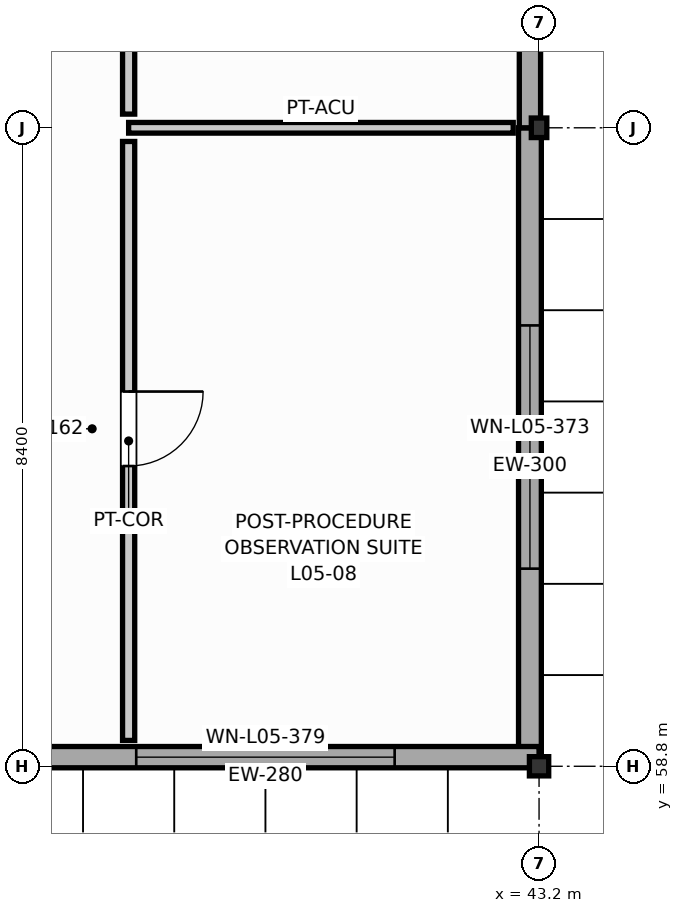
"""IFC4 building model, lengths in metres.
Left out: names, types, materials, properties, quantities, classifications, styles, units other than length and angle.
Written with IfcOpenShell. Run it as: python <this file> out.ifc"""

import sys

from ifc_helpers import new_model, si_unit, direction, frame, frame_2d, origin, origin_2d, place, context, subcontext, project, spatial, rectangle, i_section, extrude, element, fill, save


model = new_model("IFC4")
c1 = context("Model", 3, precision=1e-05, world=origin(), true_north=direction((0.0, 1.0)))
c2 = subcontext(c1, "Body", "Model", "MODEL_VIEW")
j1 = project(units=[si_unit("LENGTHUNIT", "METRE"), si_unit("PLANEANGLEUNIT", "RADIAN")], contexts=[c1])
p1 = place(None, origin())
s1 = spatial("IfcSite", under=j1, at=p1, CompositionType="ELEMENT")
p2 = place(p1, origin())
s2 = spatial("IfcBuilding", under=s1, at=p2, CompositionType="ELEMENT")
p3 = place(p2, frame((0.0, 0.0, 21.6)))
s3 = spatial("IfcBuildingStorey", under=s2, at=p3, CompositionType="ELEMENT", Elevation=21.6)
p4 = place(p3, frame((43.2, 58.8, 0.0), z_axis=(0.0, 0.0, 1.0), x_axis=(1.0, 0.0, 0.0)))
e1 = element("IfcColumn", 1, at=p4, inside=s3, PredefinedType="COLUMN", context=c2, shape_type="SweptSolid", body=[
    extrude(i_section(OverallWidth=0.254, OverallDepth=0.253, WebThickness=0.009, FlangeThickness=0.014, FilletRadius=0.013, at=origin_2d()), origin(), (0.0, 0.0, 1.0), 4.2),
])
p5 = place(p3, frame((43.2, 67.2, 0.0), z_axis=(0.0, 0.0, 1.0), x_axis=(1.0, 0.0, 0.0)))
e2 = element("IfcColumn", 2, at=p5, inside=s3, PredefinedType="COLUMN", context=c2, shape_type="SweptSolid", body=[
    extrude(i_section(OverallWidth=0.204, OverallDepth=0.257, WebThickness=0.009, FlangeThickness=0.016, FilletRadius=0.013, at=origin_2d()), origin(), (0.0, 0.0, 1.0), 4.2),
])
p6 = place(p3, frame((43.08, 58.8, 0.0), z_axis=(0.0, 0.0, 1.0), x_axis=(0.0, 1.0, 0.0)))
e3 = element("IfcWall", 3, at=p6, inside=s3, PredefinedType="SOLIDWALL", context=c2, shape_type="SweptSolid", body=[
    extrude(rectangle(XDim=8.4, YDim=0.3, at=frame_2d((4.2, 0.0))), origin(), (0.0, 0.0, 1.0), 3.482),
])
p7 = place(p6, frame((2.6, 0.0, 0.95)))
e4 = element("IfcOpeningElement", 4, at=p7, cuts=e3, PredefinedType="OPENING", context=c2, shape_type="SweptSolid", body=[
    extrude(rectangle(XDim=3.2, YDim=1.15, at=frame_2d((1.6, 0.575))), frame((0.0, 0.16, 0.0), z_axis=(0.0, -1.0, 0.0), x_axis=(1.0, 0.0, 0.0)), (0.0, 0.0, 1.0), 0.32),
])
p8 = place(p3, frame((43.08, 67.2, 0.0), z_axis=(0.0, 0.0, 1.0), x_axis=(0.0, 1.0, 0.0)))
e5 = element("IfcWall", 5, at=p8, inside=s3, PredefinedType="SOLIDWALL", context=c2, shape_type="SweptSolid", body=[
    extrude(rectangle(XDim=8.4, YDim=0.28, at=frame_2d((4.2, 0.0))), origin(), (0.0, 0.0, 1.0), 3.482),
])
p9 = place(p8, frame((2.6, 0.0, 0.95)))
e6 = element("IfcOpeningElement", 6, at=p9, cuts=e5, PredefinedType="OPENING", context=c2, shape_type="SweptSolid", body=[
    extrude(rectangle(XDim=3.2, YDim=1.35, at=frame_2d((1.6, 0.675))), frame((0.0, 0.15, 0.0), z_axis=(0.0, -1.0, 0.0), x_axis=(1.0, 0.0, 0.0)), (0.0, 0.0, 1.0), 0.3),
])
p10 = place(p3, frame((36.0, 58.92, 0.0), z_axis=(0.0, 0.0, 1.0), x_axis=(1.0, 0.0, 0.0)))
e7 = element("IfcWall", 7, at=p10, inside=s3, PredefinedType="SOLIDWALL", context=c2, shape_type="SweptSolid", body=[
    extrude(rectangle(XDim=7.2, YDim=0.28, at=frame_2d((3.6, 0.0))), origin(), (0.0, 0.0, 1.0), 3.529),
])
p11 = place(p10, frame((1.9, 0.0, 0.95)))
e8 = element("IfcOpeningElement", 8, at=p11, cuts=e7, PredefinedType="OPENING", context=c2, shape_type="SweptSolid", body=[
    extrude(rectangle(XDim=3.4, YDim=1.55, at=frame_2d((1.7, 0.775))), frame((0.0, 0.15, 0.0), z_axis=(0.0, -1.0, 0.0), x_axis=(1.0, 0.0, 0.0)), (0.0, 0.0, 1.0), 0.3),
])
p12 = place(p3, frame((37.8, 67.2, 0.0), z_axis=(0.0, 0.0, 1.0), x_axis=(1.0, 0.0, 0.0)))
e9 = element("IfcWall", 9, at=p12, inside=s3, PredefinedType="PARTITIONING", context=c2, shape_type="SweptSolid", body=[
    extrude(rectangle(XDim=5.06, YDim=0.14, at=frame_2d((2.53, 0.0))), origin(), (0.0, 0.0, 1.0), 3.328),
])
p13 = place(p3, frame((37.8, 59.14, 0.0), z_axis=(0.0, 0.0, 1.0), x_axis=(0.0, 1.0, 0.0)))
e10 = element("IfcWall", 10, at=p13, inside=s3, PredefinedType="PARTITIONING", context=c2, shape_type="SweptSolid", body=[
    extrude(rectangle(XDim=7.88, YDim=0.16, at=frame_2d((3.94, 0.0))), origin(), (0.0, 0.0, 1.0), 3.328),
])
p14 = place(p13, frame((3.61, 0.0, 0.0)))
e11 = element("IfcOpeningElement", 11, at=p14, cuts=e10, PredefinedType="OPENING", context=c2, shape_type="SweptSolid", body=[
    extrude(rectangle(XDim=0.98, YDim=2.05, at=frame_2d((0.49, 1.025))), frame((0.0, 0.09, 0.0), z_axis=(0.0, -1.0, 0.0), x_axis=(1.0, 0.0, 0.0)), (0.0, 0.0, 1.0), 0.18),
])
p15 = place(p3, frame((37.8, 67.38, 0.0), z_axis=(0.0, 0.0, 1.0), x_axis=(0.0, 1.0, 0.0)))
e12 = element("IfcWall", 12, at=p15, inside=s3, PredefinedType="PARTITIONING", context=c2, shape_type="SweptSolid", body=[
    extrude(rectangle(XDim=8.22, YDim=0.16, at=frame_2d((4.11, 0.0))), origin(), (0.0, 0.0, 1.0), 3.328),
])
p16 = place(p15, frame((3.71, 0.0, 0.0)))
e13 = element("IfcOpeningElement", 13, at=p16, cuts=e12, PredefinedType="OPENING", context=c2, shape_type="SweptSolid", body=[
    extrude(rectangle(XDim=0.94, YDim=2.05, at=frame_2d((0.47, 1.025))), frame((0.0, 0.09, 0.0), z_axis=(0.0, -1.0, 0.0), x_axis=(1.0, 0.0, 0.0)), (0.0, 0.0, 1.0), 0.18),
])
p17 = place(p7, origin())
e14 = element("IfcWindow", 14, at=p17, inside=s3, PartitioningType="SINGLE_PANEL", PredefinedType="WINDOW", context=c2, shape_type="SweptSolid", body=[
    extrude(rectangle(XDim=3.2, YDim=1.15, at=frame_2d((1.6, 0.575))), frame((0.0, 0.03, 0.0), z_axis=(0.0, -1.0, 0.0), x_axis=(1.0, 0.0, 0.0)), (0.0, 0.0, 1.0), 0.06),
])
fill(e4, e14)
p18 = place(p11, origin())
e15 = element("IfcWindow", 15, at=p18, inside=s3, PartitioningType="SINGLE_PANEL", PredefinedType="WINDOW", context=c2, shape_type="SweptSolid", body=[
    extrude(rectangle(XDim=3.4, YDim=1.55, at=frame_2d((1.7, 0.775))), frame((0.0, 0.03, 0.0), z_axis=(0.0, -1.0, 0.0), x_axis=(1.0, 0.0, 0.0)), (0.0, 0.0, 1.0), 0.06),
])
fill(e8, e15)
p19 = place(p14, frame((0.98, 0.0, 0.0), z_axis=(0.0, 0.0, 1.0), x_axis=(-1.0, 0.0, 0.0)))
e16 = element("IfcDoor", 16, at=p19, inside=s3, OperationType="SINGLE_SWING_LEFT", PredefinedType="DOOR", context=c2, shape_type="SweptSolid", body=[
    extrude(rectangle(XDim=0.98, YDim=2.05, at=frame_2d((0.49, 1.025))), frame((0.0, 0.025, 0.0), z_axis=(0.0, -1.0, 0.0), x_axis=(1.0, 0.0, 0.0)), (0.0, 0.0, 1.0), 0.05),
])
fill(e11, e16)
save(model, sys.argv[1])
